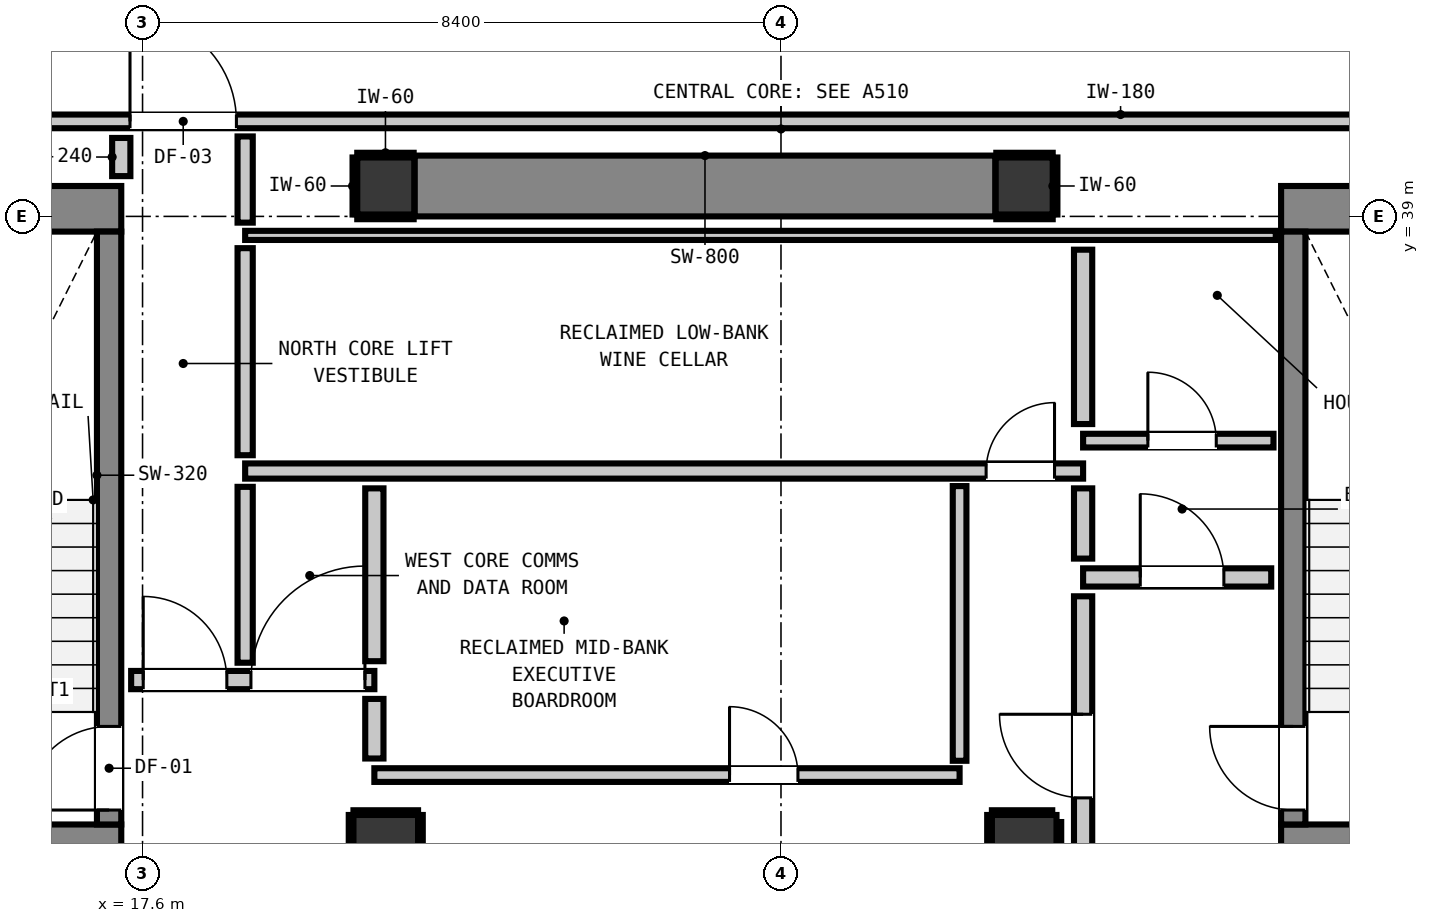
"""IFC4 building model, lengths in metres.
Left out: names, types, materials, properties, quantities, classifications, styles, units other than length and angle.
Written with IfcOpenShell. Run it as: python <this file> out.ifc"""

import sys

from ifc_helpers import new_model, si_unit, direction, frame, frame_2d, origin, origin_2d, place, context, subcontext, project, spatial, rectangle, extrude, element, fill, save


model = new_model("IFC4")
c1 = context("Model", 3, precision=1e-05, world=origin(), true_north=direction((0.0, 1.0)))
c2 = subcontext(c1, "Body", "Model", "MODEL_VIEW")
j1 = project(units=[si_unit("LENGTHUNIT", "METRE"), si_unit("PLANEANGLEUNIT", "RADIAN")], contexts=[c1])
p1 = place(None, origin())
s1 = spatial("IfcSite", under=j1, at=p1, CompositionType="ELEMENT")
p2 = place(p1, origin())
s2 = spatial("IfcBuilding", under=s1, at=p2, CompositionType="ELEMENT")
p3 = place(p2, frame((0.0, 0.0, 244.56)))
s3 = spatial("IfcBuildingStorey", under=s2, at=p3, CompositionType="ELEMENT", Elevation=244.56)
for number, where, z_axis, x_axis in (
    (1, (20.8, 39.4, 0.0), (0.0, 0.0, 1.0), (1.0, 0.0, 0.0)),
    (2, (29.2, 39.4, 0.0), (0.0, 0.0, 1.0), (1.0, 0.0, 0.0)),
):
    element("IfcColumn", number, at=place(p3, frame(where, z_axis=z_axis, x_axis=x_axis)), inside=s3, PredefinedType="COLUMN", context=c2, shape_type="SweptSolid", body=[
        extrude(rectangle(XDim=0.75, YDim=0.75, at=origin_2d()), origin(), (0.0, 0.0, 1.0), 3.32),
    ])
p4 = place(p3, frame((13.24, 39.1, 0.0), z_axis=(0.0, 0.0, 1.0), x_axis=(1.0, 0.0, 0.0)))
e3 = element("IfcWall", 3, at=p4, inside=s3, PredefinedType="SHEAR", context=c2, shape_type="SweptSolid", body=[
    extrude(rectangle(XDim=4.08, YDim=0.6, at=frame_2d((2.04, 0.0))), origin(), (0.0, 0.0, 1.0), 3.32),
])
p5 = place(p3, frame((13.78, 30.7, 0.0), z_axis=(0.0, 0.0, 1.0), x_axis=(1.0, 0.0, 0.0)))
e4 = element("IfcWall", 4, at=p5, inside=s3, PredefinedType="SHEAR", context=c2, shape_type="SweptSolid", body=[
    extrude(rectangle(XDim=3.54, YDim=0.6, at=frame_2d((1.77, 0.0))), origin(), (0.0, 0.0, 1.0), 3.32),
])
p6 = place(p3, frame((32.58, 39.1, 0.0), z_axis=(0.0, 0.0, 1.0), x_axis=(1.0, 0.0, 0.0)))
e5 = element("IfcWall", 5, at=p6, inside=s3, PredefinedType="SHEAR", context=c2, shape_type="SweptSolid", body=[
    extrude(rectangle(XDim=4.08, YDim=0.6, at=frame_2d((2.04, 0.0))), origin(), (0.0, 0.0, 1.0), 3.32),
])
p7 = place(p3, frame((32.58, 30.7, 0.0), z_axis=(0.0, 0.0, 1.0), x_axis=(1.0, 0.0, 0.0)))
e6 = element("IfcWall", 6, at=p7, inside=s3, PredefinedType="SHEAR", context=c2, shape_type="SweptSolid", body=[
    extrude(rectangle(XDim=3.54, YDim=0.6, at=frame_2d((1.77, 0.0))), origin(), (0.0, 0.0, 1.0), 3.32),
])
p8 = place(p3, frame((21.18, 39.4, 0.0), z_axis=(0.0, 0.0, 1.0), x_axis=(1.0, 0.0, 0.0)))
e7 = element("IfcWall", 7, at=p8, inside=s3, PredefinedType="SHEAR", context=c2, shape_type="SweptSolid", body=[
    extrude(rectangle(XDim=7.64, YDim=0.8, at=frame_2d((3.82, 0.0))), origin(), (0.0, 0.0, 1.0), 3.32),
])
p9 = place(p3, frame((17.16, 31.0, 0.0), z_axis=(0.0, 0.0, 1.0), x_axis=(0.0, 1.0, 0.0)))
e8 = element("IfcWall", 8, at=p9, inside=s3, PredefinedType="SHEAR", context=c2, shape_type="SweptSolid", body=[
    extrude(rectangle(XDim=7.8, YDim=0.32, at=frame_2d((3.9, 0.0))), origin(), (0.0, 0.0, 1.0), 3.32),
])
p10 = place(p9, frame((0.19, 0.0, 0.0)))
e9 = element("IfcOpeningElement", 9, at=p10, cuts=e8, PredefinedType="OPENING", context=c2, shape_type="SweptSolid", body=[
    extrude(rectangle(XDim=1.1, YDim=2.15, at=frame_2d((0.55, 1.075))), frame((0.0, 0.17, 0.0), z_axis=(0.0, -1.0, 0.0), x_axis=(1.0, 0.0, 0.0)), (0.0, 0.0, 1.0), 0.34),
])
p11 = place(p3, frame((32.74, 31.0, 0.0), z_axis=(0.0, 0.0, 1.0), x_axis=(0.0, 1.0, 0.0)))
e10 = element("IfcWall", 10, at=p11, inside=s3, PredefinedType="SHEAR", context=c2, shape_type="SweptSolid", body=[
    extrude(rectangle(XDim=7.8, YDim=0.32, at=frame_2d((3.9, 0.0))), origin(), (0.0, 0.0, 1.0), 3.32),
])
p12 = place(p11, frame((0.19, 0.0, 0.0)))
e11 = element("IfcOpeningElement", 11, at=p12, cuts=e10, PredefinedType="OPENING", context=c2, shape_type="SweptSolid", body=[
    extrude(rectangle(XDim=1.1, YDim=2.15, at=frame_2d((0.55, 1.075))), frame((0.0, 0.17, 0.0), z_axis=(0.0, -1.0, 0.0), x_axis=(1.0, 0.0, 0.0)), (0.0, 0.0, 1.0), 0.34),
])
for number, where, z_axis, x_axis in (
    (12, (20.8, 30.7, 0.0), (0.0, 0.0, 1.0), (1.0, 0.0, 0.0)),
    (13, (29.2, 30.7, 0.0), (0.0, 0.0, 1.0), (1.0, 0.0, 0.0)),
):
    element("IfcColumn", number, at=place(p3, frame(where, z_axis=z_axis, x_axis=x_axis)), inside=s3, PredefinedType="COLUMN", context=c2, shape_type="SweptSolid", body=[
        extrude(rectangle(XDim=0.85, YDim=0.85, at=origin_2d()), origin(), (0.0, 0.0, 1.0), 3.32),
    ])
p13 = place(p3, frame((17.45, 32.9, 0.0), z_axis=(0.0, 0.0, 1.0), x_axis=(1.0, 0.0, 0.0)))
e14 = element("IfcWall", 14, at=p13, inside=s3, PredefinedType="PARTITIONING", context=c2, shape_type="SweptSolid", body=[
    extrude(rectangle(XDim=3.2, YDim=0.24, at=frame_2d((1.6, 0.0))), origin(), (0.0, 0.0, 1.0), 3.1),
])
p14 = place(p13, frame((0.159, 0.0, 0.0)))
e15 = element("IfcOpeningElement", 15, at=p14, cuts=e14, PredefinedType="OPENING", context=c2, shape_type="SweptSolid", body=[
    extrude(rectangle(XDim=1.1, YDim=2.15, at=frame_2d((0.55, 1.075))), frame((0.0, 0.13, 0.0), z_axis=(0.0, -1.0, 0.0), x_axis=(1.0, 0.0, 0.0)), (0.0, 0.0, 1.0), 0.26),
])
p15 = place(p13, frame((1.576, 0.0, 0.0)))
e16 = element("IfcOpeningElement", 16, at=p15, cuts=e14, PredefinedType="OPENING", context=c2, shape_type="SweptSolid", body=[
    extrude(rectangle(XDim=1.5, YDim=2.15, at=frame_2d((0.75, 1.075))), frame((0.0, 0.13, 0.0), z_axis=(0.0, -1.0, 0.0), x_axis=(1.0, 0.0, 0.0)), (0.0, 0.0, 1.0), 0.26),
])
p16 = place(p3, frame((29.975, 34.25, 0.0), z_axis=(0.0, 0.0, 1.0), x_axis=(1.0, 0.0, 0.0)))
e17 = element("IfcWall", 17, at=p16, inside=s3, PredefinedType="PARTITIONING", context=c2, shape_type="SweptSolid", body=[
    extrude(rectangle(XDim=2.475, YDim=0.24, at=frame_2d((1.237, 0.0))), origin(), (0.0, 0.0, 1.0), 3.1),
])
p17 = place(p16, frame((0.752, 0.0, 0.0)))
e18 = element("IfcOpeningElement", 18, at=p17, cuts=e17, PredefinedType="OPENING", context=c2, shape_type="SweptSolid", body=[
    extrude(rectangle(XDim=1.1, YDim=2.15, at=frame_2d((0.55, 1.075))), frame((0.0, 0.13, 0.0), z_axis=(0.0, -1.0, 0.0), x_axis=(1.0, 0.0, 0.0)), (0.0, 0.0, 1.0), 0.26),
])
p18 = place(p3, frame((18.95, 35.65, 0.0), z_axis=(0.0, 0.0, 1.0), x_axis=(1.0, 0.0, 0.0)))
e19 = element("IfcWall", 19, at=p18, inside=s3, PredefinedType="PARTITIONING", context=c2, shape_type="SweptSolid", body=[
    extrude(rectangle(XDim=11.025, YDim=0.2, at=frame_2d((5.513, 0.0))), origin(), (0.0, 0.0, 1.0), 3.1),
])
p19 = place(p18, frame((9.749, 0.0, 0.0)))
e20 = element("IfcOpeningElement", 20, at=p19, cuts=e19, PredefinedType="OPENING", context=c2, shape_type="SweptSolid", body=[
    extrude(rectangle(XDim=0.9, YDim=2.1, at=frame_2d((0.45, 1.05))), frame((0.0, 0.11, 0.0), z_axis=(0.0, -1.0, 0.0), x_axis=(1.0, 0.0, 0.0)), (0.0, 0.0, 1.0), 0.22),
])
p20 = place(p3, frame((20.65, 31.65, 0.0), z_axis=(0.0, 0.0, 1.0), x_axis=(1.0, 0.0, 0.0)))
e21 = element("IfcWall", 21, at=p20, inside=s3, PredefinedType="PARTITIONING", context=c2, shape_type="SweptSolid", body=[
    extrude(rectangle(XDim=7.7, YDim=0.18, at=frame_2d((3.85, 0.0))), origin(), (0.0, 0.0, 1.0), 3.1),
])
p21 = place(p20, frame((4.673, 0.0, 0.0)))
e22 = element("IfcOpeningElement", 22, at=p21, cuts=e21, PredefinedType="OPENING", context=c2, shape_type="SweptSolid", body=[
    extrude(rectangle(XDim=0.9, YDim=2.1, at=frame_2d((0.45, 1.05))), frame((0.0, 0.1, 0.0), z_axis=(0.0, -1.0, 0.0), x_axis=(1.0, 0.0, 0.0)), (0.0, 0.0, 1.0), 0.2),
])
p22 = place(p3, frame((29.975, 36.05, 0.0), z_axis=(0.0, 0.0, 1.0), x_axis=(1.0, 0.0, 0.0)))
e23 = element("IfcWall", 23, at=p22, inside=s3, PredefinedType="PARTITIONING", context=c2, shape_type="SweptSolid", body=[
    extrude(rectangle(XDim=2.505, YDim=0.18, at=frame_2d((1.252, 0.0))), origin(), (0.0, 0.0, 1.0), 3.1),
])
p23 = place(p22, frame((0.852, 0.0, 0.0)))
e24 = element("IfcOpeningElement", 24, at=p23, cuts=e23, PredefinedType="OPENING", context=c2, shape_type="SweptSolid", body=[
    extrude(rectangle(XDim=0.9, YDim=2.1, at=frame_2d((0.45, 1.05))), frame((0.0, 0.1, 0.0), z_axis=(0.0, -1.0, 0.0), x_axis=(1.0, 0.0, 0.0)), (0.0, 0.0, 1.0), 0.2),
])
p24 = place(p3, frame((10.787, 40.25, 0.0), z_axis=(0.0, 0.0, 1.0), x_axis=(1.0, 0.0, 0.0)))
e25 = element("IfcWall", 25, at=p24, inside=s3, PredefinedType="PARTITIONING", context=c2, shape_type="SweptSolid", body=[
    extrude(rectangle(XDim=36.626, YDim=0.18, at=frame_2d((18.313, 0.0))), origin(), (0.0, 0.0, 1.0), 3.1),
])
p25 = place(p24, frame((6.648, 0.0, 0.0)))
e26 = element("IfcOpeningElement", 26, at=p25, cuts=e25, PredefinedType="OPENING", context=c2, shape_type="SweptSolid", body=[
    extrude(rectangle(XDim=1.4, YDim=2.15, at=frame_2d((0.7, 1.075))), frame((0.0, 0.1, 0.0), z_axis=(0.0, -1.0, 0.0), x_axis=(1.0, 0.0, 0.0)), (0.0, 0.0, 1.0), 0.2),
])
p26 = place(p24, frame((31.314, 0.0, 0.0)))
e27 = element("IfcOpeningElement", 27, at=p26, cuts=e25, PredefinedType="OPENING", context=c2, shape_type="SweptSolid", body=[
    extrude(rectangle(XDim=0.9, YDim=2.1, at=frame_2d((0.45, 1.05))), frame((0.0, 0.1, 0.0), z_axis=(0.0, -1.0, 0.0), x_axis=(1.0, 0.0, 0.0)), (0.0, 0.0, 1.0), 0.2),
])
p27 = place(p3, frame((18.95, 38.75, 0.0), z_axis=(0.0, 0.0, 1.0), x_axis=(1.0, 0.0, 0.0)))
e28 = element("IfcWall", 28, at=p27, inside=s3, PredefinedType="PARTITIONING", context=c2, shape_type="SweptSolid", body=[
    extrude(rectangle(XDim=13.56, YDim=0.12, at=frame_2d((6.78, 0.0))), origin(), (0.0, 0.0, 1.0), 3.1),
])
p28 = place(p3, frame((17.32, 39.53, 0.0), z_axis=(0.0, 0.0, 1.0), x_axis=(0.0, 1.0, 0.0)))
e29 = element("IfcWall", 29, at=p28, inside=s3, PredefinedType="PARTITIONING", context=c2, shape_type="SweptSolid", body=[
    extrude(rectangle(XDim=0.502, YDim=0.24, at=frame_2d((0.251, 0.0))), origin(), (0.0, 0.0, 1.0), 3.1),
])
p29 = place(p3, frame((20.65, 31.868, 0.0), z_axis=(0.0, 0.0, 1.0), x_axis=(0.0, 1.0, 0.0)))
e30 = element("IfcWall", 30, at=p29, inside=s3, PredefinedType="PARTITIONING", context=c2, shape_type="SweptSolid", body=[
    extrude(rectangle(XDim=0.784, YDim=0.24, at=frame_2d((0.392, 0.0))), origin(), (0.0, 0.0, 1.0), 2.335),
])
p30 = place(p3, frame((20.65, 33.148, 0.0), z_axis=(0.0, 0.0, 1.0), x_axis=(0.0, 1.0, 0.0)))
e31 = element("IfcWall", 31, at=p30, inside=s3, PredefinedType="PARTITIONING", context=c2, shape_type="SweptSolid", body=[
    extrude(rectangle(XDim=2.274, YDim=0.24, at=frame_2d((1.137, 0.0))), origin(), (0.0, 0.0, 1.0), 2.335),
])
p31 = place(p3, frame((29.975, 29.768, 0.0), z_axis=(0.0, 0.0, 1.0), x_axis=(0.0, 1.0, 0.0)))
e32 = element("IfcWall", 32, at=p31, inside=s3, PredefinedType="PARTITIONING", context=c2, shape_type="SweptSolid", body=[
    extrude(rectangle(XDim=4.234, YDim=0.24, at=frame_2d((2.117, 0.0))), origin(), (0.0, 0.0, 1.0), 3.1),
])
p32 = place(p31, frame((1.582, 0.0, 0.0)))
e33 = element("IfcOpeningElement", 33, at=p32, cuts=e32, PredefinedType="OPENING", context=c2, shape_type="SweptSolid", body=[
    extrude(rectangle(XDim=1.1, YDim=2.15, at=frame_2d((0.55, 1.075))), frame((0.0, 0.13, 0.0), z_axis=(0.0, -1.0, 0.0), x_axis=(1.0, 0.0, 0.0)), (0.0, 0.0, 1.0), 0.26),
])
p33 = place(p3, frame((29.975, 34.498, 0.0), z_axis=(0.0, 0.0, 1.0), x_axis=(0.0, 1.0, 0.0)))
e34 = element("IfcWall", 34, at=p33, inside=s3, PredefinedType="PARTITIONING", context=c2, shape_type="SweptSolid", body=[
    extrude(rectangle(XDim=0.924, YDim=0.24, at=frame_2d((0.462, 0.0))), origin(), (0.0, 0.0, 1.0), 3.1),
])
p34 = place(p3, frame((29.975, 36.268, 0.0), z_axis=(0.0, 0.0, 1.0), x_axis=(0.0, 1.0, 0.0)))
e35 = element("IfcWall", 35, at=p34, inside=s3, PredefinedType="PARTITIONING", context=c2, shape_type="SweptSolid", body=[
    extrude(rectangle(XDim=2.294, YDim=0.24, at=frame_2d((1.147, 0.0))), origin(), (0.0, 0.0, 1.0), 3.1),
])
p35 = place(p3, frame((18.95, 33.128, 0.0), z_axis=(0.0, 0.0, 1.0), x_axis=(0.0, 1.0, 0.0)))
e36 = element("IfcWall", 36, at=p35, inside=s3, PredefinedType="PARTITIONING", context=c2, shape_type="SweptSolid", body=[
    extrude(rectangle(XDim=2.314, YDim=0.2, at=frame_2d((1.157, 0.0))), origin(), (0.0, 0.0, 1.0), 3.1),
])
p36 = place(p3, frame((18.95, 35.858, 0.0), z_axis=(0.0, 0.0, 1.0), x_axis=(0.0, 1.0, 0.0)))
e37 = element("IfcWall", 37, at=p36, inside=s3, PredefinedType="PARTITIONING", context=c2, shape_type="SweptSolid", body=[
    extrude(rectangle(XDim=2.724, YDim=0.2, at=frame_2d((1.362, 0.0))), origin(), (0.0, 0.0, 1.0), 3.1),
])
p37 = place(p3, frame((18.95, 38.918, 0.0), z_axis=(0.0, 0.0, 1.0), x_axis=(0.0, 1.0, 0.0)))
e38 = element("IfcWall", 38, at=p37, inside=s3, PredefinedType="PARTITIONING", context=c2, shape_type="SweptSolid", body=[
    extrude(rectangle(XDim=1.134, YDim=0.2, at=frame_2d((0.567, 0.0))), origin(), (0.0, 0.0, 1.0), 3.1),
])
p38 = place(p3, frame((28.35, 31.838, 0.0), z_axis=(0.0, 0.0, 1.0), x_axis=(0.0, 1.0, 0.0)))
e39 = element("IfcWall", 39, at=p38, inside=s3, PredefinedType="PARTITIONING", context=c2, shape_type="SweptSolid", body=[
    extrude(rectangle(XDim=3.614, YDim=0.18, at=frame_2d((1.807, 0.0))), origin(), (0.0, 0.0, 1.0), 3.1),
])
for number, where, z_axis, x_axis in (
    (40, (20.425, 38.993, 0.0), (0.0, 0.0, 1.0), (1.0, 0.0, 0.0)),
    (41, (20.425, 39.807, 0.0), (0.0, 0.0, 1.0), (1.0, 0.0, 0.0)),
):
    element("IfcWall", number, at=place(p3, frame(where, z_axis=z_axis, x_axis=x_axis)), inside=s3, PredefinedType="PARTITIONING", context=c2, shape_type="SweptSolid", body=[
        extrude(rectangle(XDim=0.742, YDim=0.06, at=frame_2d((0.371, 0.0))), origin(), (0.0, 0.0, 1.0), 1.45),
    ])
p39 = place(p3, frame((20.393, 39.025, 0.0), z_axis=(0.0, 0.0, 1.0), x_axis=(0.0, 1.0, 0.0)))
e42 = element("IfcWall", 42, at=p39, inside=s3, PredefinedType="PARTITIONING", context=c2, shape_type="SweptSolid", body=[
    extrude(rectangle(XDim=0.75, YDim=0.06, at=frame_2d((0.375, 0.0))), origin(), (0.0, 0.0, 1.0), 1.45),
])
for number, where, z_axis, x_axis in (
    (43, (28.833, 38.993, 0.0), (0.0, 0.0, 1.0), (1.0, 0.0, 0.0)),
    (44, (28.833, 39.807, 0.0), (0.0, 0.0, 1.0), (1.0, 0.0, 0.0)),
):
    element("IfcWall", number, at=place(p3, frame(where, z_axis=z_axis, x_axis=x_axis)), inside=s3, PredefinedType="PARTITIONING", context=c2, shape_type="SweptSolid", body=[
        extrude(rectangle(XDim=0.742, YDim=0.06, at=frame_2d((0.371, 0.0))), origin(), (0.0, 0.0, 1.0), 1.45),
    ])
p40 = place(p3, frame((29.607, 39.025, 0.0), z_axis=(0.0, 0.0, 1.0), x_axis=(0.0, 1.0, 0.0)))
e45 = element("IfcWall", 45, at=p40, inside=s3, PredefinedType="PARTITIONING", context=c2, shape_type="SweptSolid", body=[
    extrude(rectangle(XDim=0.75, YDim=0.06, at=frame_2d((0.375, 0.0))), origin(), (0.0, 0.0, 1.0), 1.45),
])
for number, where, z_axis, x_axis in (
    (46, (20.375, 31.157, 0.0), (0.0, 0.0, 1.0), (1.0, 0.0, 0.0)),
    (47, (20.343, 30.275, 0.0), (0.0, 0.0, 1.0), (0.0, 1.0, 0.0)),
    (48, (21.257, 30.275, 0.0), (0.0, 0.0, 1.0), (0.0, 1.0, 0.0)),
):
    element("IfcWall", number, at=place(p3, frame(where, z_axis=z_axis, x_axis=x_axis)), inside=s3, PredefinedType="PARTITIONING", context=c2, shape_type="SweptSolid", body=[
        extrude(rectangle(XDim=0.85, YDim=0.06, at=frame_2d((0.425, 0.0))), origin(), (0.0, 0.0, 1.0), 1.45),
    ])
p41 = place(p3, frame((28.775, 31.157, 0.0), z_axis=(0.0, 0.0, 1.0), x_axis=(1.0, 0.0, 0.0)))
e49 = element("IfcWall", 49, at=p41, inside=s3, PredefinedType="PARTITIONING", context=c2, shape_type="SweptSolid", body=[
    extrude(rectangle(XDim=0.794, YDim=0.06, at=frame_2d((0.397, 0.0))), origin(), (0.0, 0.0, 1.0), 1.45),
])
p42 = place(p3, frame((28.743, 30.275, 0.0), z_axis=(0.0, 0.0, 1.0), x_axis=(0.0, 1.0, 0.0)))
e50 = element("IfcWall", 50, at=p42, inside=s3, PredefinedType="PARTITIONING", context=c2, shape_type="SweptSolid", body=[
    extrude(rectangle(XDim=0.85, YDim=0.06, at=frame_2d((0.425, 0.0))), origin(), (0.0, 0.0, 1.0), 1.45),
])
p43 = place(p3, frame((29.657, 30.275, 0.0), z_axis=(0.0, 0.0, 1.0), x_axis=(0.0, 1.0, 0.0)))
e51 = element("IfcWall", 51, at=p43, inside=s3, PredefinedType="PARTITIONING", context=c2, shape_type="SweptSolid", body=[
    extrude(rectangle(XDim=0.757, YDim=0.06, at=frame_2d((0.378, 0.0))), origin(), (0.0, 0.0, 1.0), 1.45),
])
p44 = place(p10, origin())
e52 = element("IfcDoor", 52, at=p44, inside=s3, OperationType="SINGLE_SWING_LEFT", PredefinedType="DOOR", context=c2, shape_type="SweptSolid", body=[
    extrude(rectangle(XDim=1.1, YDim=2.15, at=frame_2d((0.55, 1.075))), frame((0.0, 0.025, 0.0), z_axis=(0.0, -1.0, 0.0), x_axis=(1.0, 0.0, 0.0)), (0.0, 0.0, 1.0), 0.05),
])
fill(e9, e52)
p45 = place(p12, origin())
e53 = element("IfcDoor", 53, at=p45, inside=s3, OperationType="SINGLE_SWING_RIGHT", PredefinedType="DOOR", context=c2, shape_type="SweptSolid", body=[
    extrude(rectangle(XDim=1.1, YDim=2.15, at=frame_2d((0.55, 1.075))), frame((0.0, 0.025, 0.0), z_axis=(0.0, -1.0, 0.0), x_axis=(1.0, 0.0, 0.0)), (0.0, 0.0, 1.0), 0.05),
])
fill(e11, e53)
p46 = place(p14, origin())
e54 = element("IfcDoor", 54, at=p46, inside=s3, OperationType="SINGLE_SWING_LEFT", PredefinedType="DOOR", context=c2, shape_type="SweptSolid", body=[
    extrude(rectangle(XDim=1.1, YDim=2.15, at=frame_2d((0.55, 1.075))), frame((0.0, 0.025, 0.0), z_axis=(0.0, -1.0, 0.0), x_axis=(1.0, 0.0, 0.0)), (0.0, 0.0, 1.0), 0.05),
])
fill(e15, e54)
p47 = place(p32, origin())
e55 = element("IfcDoor", 55, at=p47, inside=s3, OperationType="SINGLE_SWING_RIGHT", PredefinedType="DOOR", context=c2, shape_type="SweptSolid", body=[
    extrude(rectangle(XDim=1.1, YDim=2.15, at=frame_2d((0.55, 1.075))), frame((0.0, 0.025, 0.0), z_axis=(0.0, -1.0, 0.0), x_axis=(1.0, 0.0, 0.0)), (0.0, 0.0, 1.0), 0.05),
])
fill(e33, e55)
p48 = place(p17, origin())
e56 = element("IfcDoor", 56, at=p48, inside=s3, OperationType="SINGLE_SWING_LEFT", PredefinedType="DOOR", context=c2, shape_type="SweptSolid", body=[
    extrude(rectangle(XDim=1.1, YDim=2.15, at=frame_2d((0.55, 1.075))), frame((0.0, 0.025, 0.0), z_axis=(0.0, -1.0, 0.0), x_axis=(1.0, 0.0, 0.0)), (0.0, 0.0, 1.0), 0.05),
])
fill(e18, e56)
p49 = place(p25, origin())
e57 = element("IfcDoor", 57, at=p49, inside=s3, OperationType="SINGLE_SWING_LEFT", PredefinedType="DOOR", context=c2, shape_type="SweptSolid", body=[
    extrude(rectangle(XDim=1.4, YDim=2.15, at=frame_2d((0.7, 1.075))), frame((0.0, 0.025, 0.0), z_axis=(0.0, -1.0, 0.0), x_axis=(1.0, 0.0, 0.0)), (0.0, 0.0, 1.0), 0.05),
])
fill(e26, e57)
p50 = place(p15, origin())
e58 = element("IfcDoor", 58, at=p50, inside=s3, OperationType="SINGLE_SWING_RIGHT", PredefinedType="DOOR", context=c2, shape_type="SweptSolid", body=[
    extrude(rectangle(XDim=1.5, YDim=2.15, at=frame_2d((0.75, 1.075))), frame((0.0, 0.025, 0.0), z_axis=(0.0, -1.0, 0.0), x_axis=(1.0, 0.0, 0.0)), (0.0, 0.0, 1.0), 0.05),
])
fill(e16, e58)
p51 = place(p23, origin())
e59 = element("IfcDoor", 59, at=p51, inside=s3, OperationType="SINGLE_SWING_LEFT", PredefinedType="DOOR", context=c2, shape_type="SweptSolid", body=[
    extrude(rectangle(XDim=0.9, YDim=2.1, at=frame_2d((0.45, 1.05))), frame((0.0, 0.025, 0.0), z_axis=(0.0, -1.0, 0.0), x_axis=(1.0, 0.0, 0.0)), (0.0, 0.0, 1.0), 0.05),
])
fill(e24, e59)
p52 = place(p19, origin())
e60 = element("IfcDoor", 60, at=p52, inside=s3, OperationType="SINGLE_SWING_RIGHT", PredefinedType="DOOR", context=c2, shape_type="SweptSolid", body=[
    extrude(rectangle(XDim=0.9, YDim=2.1, at=frame_2d((0.45, 1.05))), frame((0.0, 0.025, 0.0), z_axis=(0.0, -1.0, 0.0), x_axis=(1.0, 0.0, 0.0)), (0.0, 0.0, 1.0), 0.05),
])
fill(e20, e60)
p53 = place(p21, origin())
e61 = element("IfcDoor", 61, at=p53, inside=s3, OperationType="SINGLE_SWING_LEFT", PredefinedType="DOOR", context=c2, shape_type="SweptSolid", body=[
    extrude(rectangle(XDim=0.9, YDim=2.1, at=frame_2d((0.45, 1.05))), frame((0.0, 0.025, 0.0), z_axis=(0.0, -1.0, 0.0), x_axis=(1.0, 0.0, 0.0)), (0.0, 0.0, 1.0), 0.05),
])
fill(e22, e61)
save(model, sys.argv[1])
